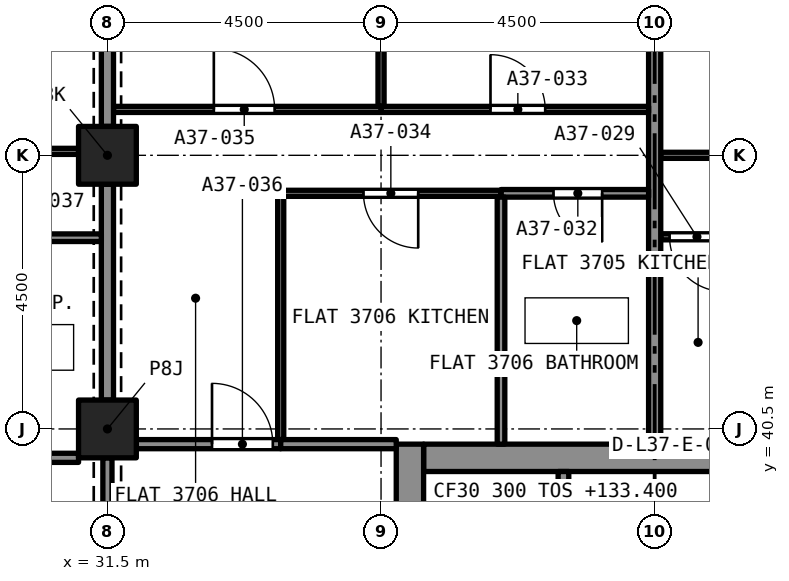
"""IFC4 building model, lengths in metres.
Left out: names, types, materials, properties, quantities, classifications, styles, units other than length and angle.
Written with IfcOpenShell. Run it as: python <this file> out.ifc"""

import sys

from ifc_helpers import new_model, si_unit, direction, frame, frame_2d, origin, origin_2d, place, context, subcontext, project, spatial, rectangle, extrude, element, fill, save


model = new_model("IFC4")
c1 = context("Model", 3, precision=1e-05, world=origin(), true_north=direction((0.0, 1.0)))
c2 = subcontext(c1, "Body", "Model", "MODEL_VIEW")
j1 = project(units=[si_unit("LENGTHUNIT", "METRE"), si_unit("PLANEANGLEUNIT", "RADIAN")], contexts=[c1])
p1 = place(None, origin())
s1 = spatial("IfcSite", under=j1, at=p1, CompositionType="ELEMENT")
p2 = place(p1, origin())
s2 = spatial("IfcBuilding", under=s1, at=p2, CompositionType="ELEMENT")
p3 = place(p2, frame((0.0, 0.0, 133.4)))
s3 = spatial("IfcBuildingStorey", under=s2, at=p3, CompositionType="ELEMENT", Elevation=133.4)
for number, where, z_axis, x_axis in (
    (1, (31.5, 40.5, 0.0), (0.0, 0.0, 1.0), (1.0, 0.0, 0.0)),
    (2, (31.5, 45.0, 0.0), (0.0, 0.0, 1.0), (1.0, 0.0, 0.0)),
):
    element("IfcColumn", number, at=place(p3, frame(where, z_axis=z_axis, x_axis=x_axis)), inside=s3, PredefinedType="COLUMN", context=c2, shape_type="SweptSolid", body=[
        extrude(rectangle(XDim=0.95, YDim=0.95, at=origin_2d()), origin(), (0.0, 0.0, 1.0), 3.2),
    ])
p4 = place(p3, frame((36.7, 40.025, 0.0), z_axis=(0.0, 0.0, 1.0), x_axis=(1.0, 0.0, 0.0)))
e3 = element("IfcWall", 3, at=p4, inside=s3, PredefinedType="SOLIDWALL", context=c2, shape_type="SweptSolid", body=[
    extrude(rectangle(XDim=7.6, YDim=0.45, at=frame_2d((3.8, 0.0))), origin(), (0.0, 0.0, 1.0), 3.2),
])
p5 = place(p3, frame((36.475, 27.25, 0.0), z_axis=(0.0, 0.0, 1.0), x_axis=(0.0, 1.0, 0.0)))
e4 = element("IfcWall", 4, at=p5, inside=s3, PredefinedType="SOLIDWALL", context=c2, shape_type="SweptSolid", body=[
    extrude(rectangle(XDim=13.0, YDim=0.45, at=frame_2d((6.5, 0.0))), origin(), (0.0, 0.0, 1.0), 3.2),
])
p6 = place(p5, frame((8.7, 0.0, 0.0)))
e5 = element("IfcOpeningElement", 5, at=p6, cuts=e4, PredefinedType="OPENING", context=c2, shape_type="SweptSolid", body=[
    extrude(rectangle(XDim=1.2, YDim=2.1, at=frame_2d((0.6, 1.05))), frame((0.0, 0.235, 0.0), z_axis=(0.0, -1.0, 0.0), x_axis=(1.0, 0.0, 0.0)), (0.0, 0.0, 1.0), 0.47),
])
p7 = place(p3, frame((40.6, 45.0, 0.0), z_axis=(0.0, 0.0, 1.0), x_axis=(1.0, 0.0, 0.0)))
e6 = element("IfcWall", 6, at=p7, inside=s3, PredefinedType="PARTITIONING", context=c2, shape_type="SweptSolid", body=[
    extrude(rectangle(XDim=4.4, YDim=0.1, at=frame_2d((2.2, 0.0))), origin(), (0.0, 0.0, 1.0), 2.9),
])
p8 = place(p7, frame((1.7, 0.0, 0.0)))
e7 = element("IfcOpeningElement", 7, at=p8, cuts=e6, PredefinedType="OPENING", context=c2, shape_type="SweptSolid", body=[
    extrude(rectangle(XDim=0.9, YDim=2.1, at=frame_2d((0.45, 1.05))), frame((0.0, 0.06, 0.0), z_axis=(0.0, -1.0, 0.0), x_axis=(1.0, 0.0, 0.0)), (0.0, 0.0, 1.0), 0.12),
])
p9 = place(p3, frame((41.891, 43.66, 0.0), z_axis=(0.0, 0.0, 1.0), x_axis=(-1.0, 0.0, 0.0)))
e8 = element("IfcWall", 8, at=p9, inside=s3, PredefinedType="PARTITIONING", context=c2, shape_type="SweptSolid", body=[
    extrude(rectangle(XDim=1.291, YDim=0.1, at=frame_2d((0.646, 0.0))), origin(), (0.0, 0.0, 1.0), 2.9),
])
p10 = place(p9, frame((0.246, 0.0, 0.0)))
e9 = element("IfcOpeningElement", 9, at=p10, cuts=e8, PredefinedType="OPENING", context=c2, shape_type="SweptSolid", body=[
    extrude(rectangle(XDim=0.9, YDim=2.1, at=frame_2d((0.45, 1.05))), frame((0.0, 0.06, 0.0), z_axis=(0.0, -1.0, 0.0), x_axis=(1.0, 0.0, 0.0)), (0.0, 0.0, 1.0), 0.12),
])
p11 = place(p3, frame((40.5, 40.25, 0.0), z_axis=(0.0, 0.0, 1.0), x_axis=(0.0, 1.0, 0.0)))
e10 = element("IfcWall", 10, at=p11, inside=s3, PredefinedType="PARTITIONING", context=c2, shape_type="SweptSolid", body=[
    extrude(rectangle(XDim=8.775, YDim=0.2, at=frame_2d((4.387, 0.0))), origin(), (0.0, 0.0, 1.0), 2.9),
])
p12 = place(p3, frame((40.4, 44.375, 0.0), z_axis=(0.0, 0.0, 1.0), x_axis=(-1.0, 0.0, 0.0)))
e11 = element("IfcWall", 11, at=p12, inside=s3, PredefinedType="PARTITIONING", context=c2, shape_type="SweptSolid", body=[
    extrude(rectangle(XDim=2.427, YDim=0.125, at=frame_2d((1.214, 0.0))), origin(), (0.0, 0.0, 1.0), 2.9),
])
p13 = place(p12, frame((0.764, 0.0, 0.0)))
e12 = element("IfcOpeningElement", 12, at=p13, cuts=e11, PredefinedType="OPENING", context=c2, shape_type="SweptSolid", body=[
    extrude(rectangle(XDim=0.8, YDim=2.1, at=frame_2d((0.4, 1.05))), frame((0.0, 0.073, 0.0), z_axis=(0.0, -1.0, 0.0), x_axis=(1.0, 0.0, 0.0)), (0.0, 0.0, 1.0), 0.145),
])
p14 = place(p3, frame((37.973, 40.25, 0.0), z_axis=(0.0, 0.0, 1.0), x_axis=(0.0, 1.0, 0.0)))
e13 = element("IfcWall", 13, at=p14, inside=s3, PredefinedType="PARTITIONING", context=c2, shape_type="SweptSolid", body=[
    extrude(rectangle(XDim=4.062, YDim=0.125, at=frame_2d((2.031, 0.0))), origin(), (0.0, 0.0, 1.0), 2.9),
])
p15 = place(p3, frame((36.0, 45.755, 0.0), z_axis=(0.0, 0.0, 1.0), x_axis=(1.0, 0.0, 0.0)))
e14 = element("IfcWall", 14, at=p15, inside=s3, PredefinedType="PARTITIONING", context=c2, shape_type="SweptSolid", body=[
    extrude(rectangle(XDim=4.4, YDim=0.1, at=frame_2d((2.2, 0.0))), origin(), (0.0, 0.0, 1.0), 2.9),
])
p16 = place(p15, frame((1.8, 0.0, 0.0)))
e15 = element("IfcOpeningElement", 15, at=p16, cuts=e14, PredefinedType="OPENING", context=c2, shape_type="SweptSolid", body=[
    extrude(rectangle(XDim=0.9, YDim=2.1, at=frame_2d((0.45, 1.05))), frame((0.0, 0.06, 0.0), z_axis=(0.0, -1.0, 0.0), x_axis=(1.0, 0.0, 0.0)), (0.0, 0.0, 1.0), 0.12),
])
p17 = place(p3, frame((36.0, 45.805, 0.0), z_axis=(0.0, 0.0, 1.0), x_axis=(0.0, 1.0, 0.0)))
e16 = element("IfcWall", 16, at=p17, inside=s3, PredefinedType="PARTITIONING", context=c2, shape_type="SweptSolid", body=[
    extrude(rectangle(XDim=3.22, YDim=0.1, at=frame_2d((1.61, 0.0))), origin(), (0.0, 0.0, 1.0), 2.9),
])
p18 = place(p3, frame((37.973, 44.375, 0.0), z_axis=(0.0, 0.0, 1.0), x_axis=(-1.0, 0.0, 0.0)))
e17 = element("IfcWall", 17, at=p18, inside=s3, PredefinedType="PARTITIONING", context=c2, shape_type="SweptSolid", body=[
    extrude(rectangle(XDim=3.673, YDim=0.1, at=frame_2d((1.836, 0.0))), origin(), (0.0, 0.0, 1.0), 2.9),
])
p19 = place(p18, frame((1.361, 0.0, 0.0)))
e18 = element("IfcOpeningElement", 18, at=p19, cuts=e17, PredefinedType="OPENING", context=c2, shape_type="SweptSolid", body=[
    extrude(rectangle(XDim=0.9, YDim=2.1, at=frame_2d((0.45, 1.05))), frame((0.0, 0.06, 0.0), z_axis=(0.0, -1.0, 0.0), x_axis=(1.0, 0.0, 0.0)), (0.0, 0.0, 1.0), 0.12),
])
p20 = place(p3, frame((34.35, 40.325, 0.0), z_axis=(0.0, 0.0, 1.0), x_axis=(0.0, 1.0, 0.0)))
e19 = element("IfcWall", 19, at=p20, inside=s3, PredefinedType="PARTITIONING", context=c2, shape_type="SweptSolid", body=[
    extrude(rectangle(XDim=4.0, YDim=0.1, at=frame_2d((2.0, 0.0))), origin(), (0.0, 0.0, 1.0), 2.9),
])
p21 = place(p3, frame((31.6, 45.755, 0.0), z_axis=(0.0, 0.0, 1.0), x_axis=(1.0, 0.0, 0.0)))
e20 = element("IfcWall", 20, at=p21, inside=s3, PredefinedType="PARTITIONING", context=c2, shape_type="SweptSolid", body=[
    extrude(rectangle(XDim=4.4, YDim=0.1, at=frame_2d((2.2, 0.0))), origin(), (0.0, 0.0, 1.0), 2.9),
])
p22 = place(p21, frame((1.65, 0.0, 0.0)))
e21 = element("IfcOpeningElement", 21, at=p22, cuts=e20, PredefinedType="OPENING", context=c2, shape_type="SweptSolid", body=[
    extrude(rectangle(XDim=1.0, YDim=2.1, at=frame_2d((0.5, 1.05))), frame((0.0, 0.06, 0.0), z_axis=(0.0, -1.0, 0.0), x_axis=(1.0, 0.0, 0.0)), (0.0, 0.0, 1.0), 0.12),
])
for number, where, z_axis, x_axis in (
    (22, (31.5, 40.975, 0.0), (0.0, 0.0, 1.0), (0.0, 1.0, 0.0)),
    (23, (31.5, 45.475, 0.0), (0.0, 0.0, 1.0), (0.0, 1.0, 0.0)),
):
    element("IfcWall", number, at=place(p3, frame(where, z_axis=z_axis, x_axis=x_axis)), inside=s3, PredefinedType="PARTITIONING", context=c2, shape_type="SweptSolid", body=[
        extrude(rectangle(XDim=3.55, YDim=0.2, at=frame_2d((1.775, 0.0))), origin(), (0.0, 0.0, 1.0), 2.38),
    ])
p23 = place(p3, frame((31.975, 40.25, 0.0), z_axis=(0.0, 0.0, 1.0), x_axis=(1.0, 0.0, 0.0)))
e24 = element("IfcWall", 24, at=p23, inside=s3, PredefinedType="PARTITIONING", context=c2, shape_type="SweptSolid", body=[
    extrude(rectangle(XDim=2.375, YDim=0.15, at=frame_2d((1.188, 0.0))), origin(), (0.0, 0.0, 1.0), 2.9),
])
p24 = place(p23, frame((1.245, 0.0, 0.0)))
e25 = element("IfcOpeningElement", 25, at=p24, cuts=e24, PredefinedType="OPENING", context=c2, shape_type="SweptSolid", body=[
    extrude(rectangle(XDim=1.0, YDim=2.1, at=frame_2d((0.5, 1.05))), frame((0.0, 0.085, 0.0), z_axis=(0.0, -1.0, 0.0), x_axis=(1.0, 0.0, 0.0)), (0.0, 0.0, 1.0), 0.17),
])
p25 = place(p3, frame((34.35, 40.25, 0.0), z_axis=(0.0, 0.0, 1.0), x_axis=(1.0, 0.0, 0.0)))
e26 = element("IfcWall", 26, at=p25, inside=s3, PredefinedType="PARTITIONING", context=c2, shape_type="SweptSolid", body=[
    extrude(rectangle(XDim=1.9, YDim=0.15, at=frame_2d((0.95, 0.0))), origin(), (0.0, 0.0, 1.0), 2.9),
])
p26 = place(p3, frame((31.4, 43.645, 0.0), z_axis=(0.0, 0.0, 1.0), x_axis=(-1.0, 0.0, 0.0)))
e27 = element("IfcWall", 27, at=p26, inside=s3, PredefinedType="PARTITIONING", context=c2, shape_type="SweptSolid", body=[
    extrude(rectangle(XDim=2.737, YDim=0.125, at=frame_2d((1.369, 0.0))), origin(), (0.0, 0.0, 1.0), 2.75),
])
p27 = place(p26, frame((0.887, 0.0, 0.0)))
e28 = element("IfcOpeningElement", 28, at=p27, cuts=e27, PredefinedType="OPENING", context=c2, shape_type="SweptSolid", body=[
    extrude(rectangle(XDim=0.8, YDim=2.1, at=frame_2d((0.4, 1.05))), frame((0.0, 0.073, 0.0), z_axis=(0.0, -1.0, 0.0), x_axis=(1.0, 0.0, 0.0)), (0.0, 0.0, 1.0), 0.145),
])
p28 = place(p3, frame((28.725, 40.025, 0.0), z_axis=(0.0, 0.0, 1.0), x_axis=(1.0, 0.0, 0.0)))
e29 = element("IfcWall", 29, at=p28, inside=s3, PredefinedType="PARTITIONING", context=c2, shape_type="SweptSolid", body=[
    extrude(rectangle(XDim=2.3, YDim=0.15, at=frame_2d((1.15, 0.0))), origin(), (0.0, 0.0, 1.0), 2.75),
])
p29 = place(p3, frame((27.0, 45.065, 0.0), z_axis=(0.0, 0.0, 1.0), x_axis=(1.0, 0.0, 0.0)))
e30 = element("IfcWall", 30, at=p29, inside=s3, PredefinedType="PARTITIONING", context=c2, shape_type="SweptSolid", body=[
    extrude(rectangle(XDim=4.025, YDim=0.1, at=frame_2d((2.012, 0.0))), origin(), (0.0, 0.0, 1.0), 2.75),
])
p30 = place(p29, frame((1.8, 0.0, 0.0)))
e31 = element("IfcOpeningElement", 31, at=p30, cuts=e30, PredefinedType="OPENING", context=c2, shape_type="SweptSolid", body=[
    extrude(rectangle(XDim=0.9, YDim=2.1, at=frame_2d((0.45, 1.05))), frame((0.0, 0.06, 0.0), z_axis=(0.0, -1.0, 0.0), x_axis=(1.0, 0.0, 0.0)), (0.0, 0.0, 1.0), 0.12),
])
p31 = place(p3, frame((31.5, 36.475, 0.0), z_axis=(0.0, 0.0, 1.0), x_axis=(0.0, 1.0, 0.0)))
e32 = element("IfcWall", 32, at=p31, inside=s3, PredefinedType="PARTITIONING", context=c2, shape_type="SweptSolid", body=[
    extrude(rectangle(XDim=3.55, YDim=0.15, at=frame_2d((1.775, 0.0))), origin(), (0.0, 0.0, 1.0), 2.38),
])
p32 = place(p31, frame((1.175, 0.0, 0.0)))
e33 = element("IfcOpeningElement", 33, at=p32, cuts=e32, PredefinedType="OPENING", context=c2, shape_type="SweptSolid", body=[
    extrude(rectangle(XDim=1.2, YDim=2.1, at=frame_2d((0.6, 1.05))), frame((0.0, 0.085, 0.0), z_axis=(0.0, -1.0, 0.0), x_axis=(1.0, 0.0, 0.0)), (0.0, 0.0, 1.0), 0.17),
])
p33 = place(p3, frame((39.0, 37.5, 0.0), z_axis=(0.0, 0.0, 1.0), x_axis=(0.0, 1.0, 0.0)))
e34 = element("IfcWall", 34, at=p33, inside=s3, PredefinedType="SOLIDWALL", context=c2, shape_type="SweptSolid", body=[
    extrude(rectangle(XDim=2.3, YDim=0.175, at=frame_2d((1.15, 0.0))), origin(), (0.0, 0.0, 1.0), 2.9),
])
p34 = place(p10, origin())
e35 = element("IfcDoor", 35, at=p34, inside=s3, OperationType="SINGLE_SWING_RIGHT", PredefinedType="DOOR", context=c2, shape_type="SweptSolid", body=[
    extrude(rectangle(XDim=0.9, YDim=2.1, at=frame_2d((0.45, 1.05))), frame((0.0, 0.025, 0.0), z_axis=(0.0, -1.0, 0.0), x_axis=(1.0, 0.0, 0.0)), (0.0, 0.0, 1.0), 0.05),
])
fill(e9, e35)
p35 = place(p13, origin())
e36 = element("IfcDoor", 36, at=p35, inside=s3, OperationType="SINGLE_SWING_LEFT", PredefinedType="DOOR", context=c2, shape_type="SweptSolid", body=[
    extrude(rectangle(XDim=0.8, YDim=2.1, at=frame_2d((0.4, 1.05))), frame((0.0, 0.025, 0.0), z_axis=(0.0, -1.0, 0.0), x_axis=(1.0, 0.0, 0.0)), (0.0, 0.0, 1.0), 0.05),
])
fill(e12, e36)
p36 = place(p16, origin())
e37 = element("IfcDoor", 37, at=p36, inside=s3, OperationType="SINGLE_SWING_RIGHT", PredefinedType="DOOR", context=c2, shape_type="SweptSolid", body=[
    extrude(rectangle(XDim=0.9, YDim=2.1, at=frame_2d((0.45, 1.05))), frame((0.0, 0.025, 0.0), z_axis=(0.0, -1.0, 0.0), x_axis=(1.0, 0.0, 0.0)), (0.0, 0.0, 1.0), 0.05),
])
fill(e15, e37)
p37 = place(p19, origin())
e38 = element("IfcDoor", 38, at=p37, inside=s3, OperationType="SINGLE_SWING_LEFT", PredefinedType="DOOR", context=c2, shape_type="SweptSolid", body=[
    extrude(rectangle(XDim=0.9, YDim=2.1, at=frame_2d((0.45, 1.05))), frame((0.0, 0.025, 0.0), z_axis=(0.0, -1.0, 0.0), x_axis=(1.0, 0.0, 0.0)), (0.0, 0.0, 1.0), 0.05),
])
fill(e18, e38)
p38 = place(p22, origin())
e39 = element("IfcDoor", 39, at=p38, inside=s3, OperationType="SINGLE_SWING_LEFT", PredefinedType="DOOR", context=c2, shape_type="SweptSolid", body=[
    extrude(rectangle(XDim=1.0, YDim=2.1, at=frame_2d((0.5, 1.05))), frame((0.0, 0.025, 0.0), z_axis=(0.0, -1.0, 0.0), x_axis=(1.0, 0.0, 0.0)), (0.0, 0.0, 1.0), 0.05),
])
fill(e21, e39)
p39 = place(p24, origin())
e40 = element("IfcDoor", 40, at=p39, inside=s3, OperationType="SINGLE_SWING_RIGHT", PredefinedType="DOOR", context=c2, shape_type="SweptSolid", body=[
    extrude(rectangle(XDim=1.0, YDim=2.1, at=frame_2d((0.5, 1.05))), frame((0.0, 0.025, 0.0), z_axis=(0.0, -1.0, 0.0), x_axis=(1.0, 0.0, 0.0)), (0.0, 0.0, 1.0), 0.05),
])
fill(e25, e40)
save(model, sys.argv[1])
